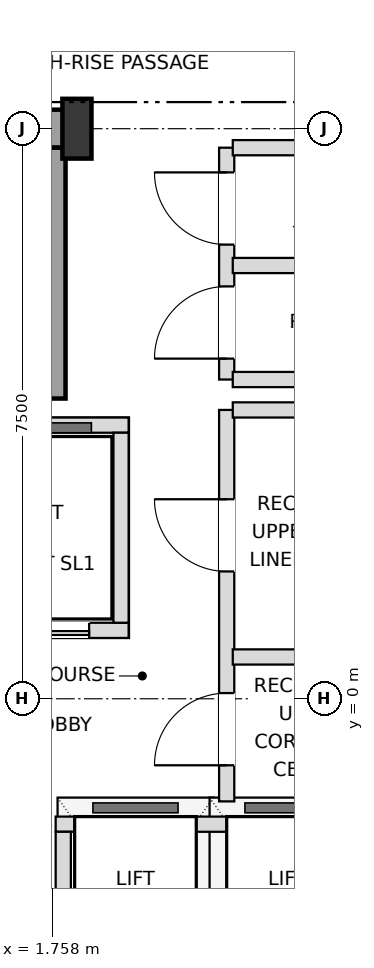
"""IFC4 building model, lengths in metres.
Left out: names, types, materials, properties, quantities, classifications, styles, units other than length and angle.
Written with IfcOpenShell. Run it as: python <this file> out.ifc"""

import sys

from ifc_helpers import new_model, si_unit, direction, frame, frame_2d, origin, origin_2d, place, context, subcontext, project, spatial, rectangle, i_section, extrude, element, fill, save


model = new_model("IFC4")
c1 = context("Model", 3, precision=1e-05, world=origin(), true_north=direction((0.0, 1.0)))
c2 = subcontext(c1, "Body", "Model", "MODEL_VIEW")
j1 = project(units=[si_unit("LENGTHUNIT", "METRE"), si_unit("PLANEANGLEUNIT", "RADIAN")], contexts=[c1])
p1 = place(None, origin())
s1 = spatial("IfcSite", under=j1, at=p1, CompositionType="ELEMENT")
p2 = place(p1, origin())
s2 = spatial("IfcBuilding", under=s1, at=p2, CompositionType="ELEMENT")
p3 = place(p2, frame((0.0, 0.0, 254.7)))
s3 = spatial("IfcBuildingStorey", under=s2, at=p3, CompositionType="ELEMENT", Elevation=254.7)
p4 = place(p3, frame((2.08, 7.5, 0.0), z_axis=(0.0, 0.0, 1.0), x_axis=(1.0, 0.0, 0.0)))
e1 = element("IfcColumn", 1, at=p4, inside=s3, PredefinedType="COLUMN", context=c2, shape_type="SweptSolid", body=[
    extrude(i_section(OverallWidth=0.382, OverallDepth=0.786, WebThickness=0.02, FlangeThickness=0.033, at=origin_2d()), origin(), (0.0, 0.0, 1.0), 3.6),
])
p5 = place(p3, frame((0.0, 7.5, 0.0), z_axis=(0.0, 0.0, 1.0), x_axis=(1.0, 0.0, 0.0)))
e2 = element("IfcWall", 2, at=p5, inside=s3, PredefinedType="SHEAR", context=c2, shape_type="SweptSolid", body=[
    extrude(rectangle(XDim=2.08, YDim=0.5, at=frame_2d((1.04, 0.0))), origin(), (0.0, 0.0, 1.0), 3.38),
])
p6 = place(p3, frame((1.73, 3.95, 0.0), z_axis=(0.0, 0.0, 1.0), x_axis=(0.0, 1.0, 0.0)))
e3 = element("IfcWall", 3, at=p6, inside=s3, PredefinedType="SHEAR", context=c2, shape_type="SweptSolid", body=[
    extrude(rectangle(XDim=3.3, YDim=0.4, at=frame_2d((1.65, 0.0))), origin(), (0.0, 0.0, 1.0), 3.38),
])
p7 = place(p3, frame((-2.82, 0.9, 0.0), z_axis=(0.0, 0.0, 1.0), x_axis=(1.0, 0.0, 0.0)))
e4 = element("IfcWall", 4, at=p7, inside=s3, PredefinedType="SOLIDWALL", context=c2, shape_type="SweptSolid", body=[
    extrude(rectangle(XDim=5.58, YDim=0.2, at=frame_2d((2.79, 0.0))), origin(), (0.0, 0.0, 1.0), 3.38),
])
p8 = place(p7, frame((0.49, 0.0, 0.0)))
e5 = element("IfcOpeningElement", 5, at=p8, cuts=e4, PredefinedType="OPENING", context=c2, shape_type="SweptSolid", body=[
    extrude(rectangle(XDim=1.1, YDim=2.15, at=frame_2d((0.55, 1.075))), frame((0.0, 0.11, 0.0), z_axis=(0.0, -1.0, 0.0), x_axis=(1.0, 0.0, 0.0)), (0.0, 0.0, 1.0), 0.22),
])
p9 = place(p7, frame((2.17, 0.0, 0.0)))
e6 = element("IfcOpeningElement", 6, at=p9, cuts=e4, PredefinedType="OPENING", context=c2, shape_type="SweptSolid", body=[
    extrude(rectangle(XDim=1.1, YDim=2.15, at=frame_2d((0.55, 1.075))), frame((0.0, 0.11, 0.0), z_axis=(0.0, -1.0, 0.0), x_axis=(1.0, 0.0, 0.0)), (0.0, 0.0, 1.0), 0.22),
])
p10 = place(p7, frame((3.86, 0.0, 0.0)))
e7 = element("IfcOpeningElement", 7, at=p10, cuts=e4, PredefinedType="OPENING", context=c2, shape_type="SweptSolid", body=[
    extrude(rectangle(XDim=1.2, YDim=2.2, at=frame_2d((0.6, 1.1))), frame((0.0, 0.11, 0.0), z_axis=(0.0, -1.0, 0.0), x_axis=(1.0, 0.0, 0.0)), (0.0, 0.0, 1.0), 0.22),
])
p11 = place(p3, frame((-2.82, 3.6, 0.0), z_axis=(0.0, 0.0, 1.0), x_axis=(1.0, 0.0, 0.0)))
e8 = element("IfcWall", 8, at=p11, inside=s3, PredefinedType="SOLIDWALL", context=c2, shape_type="SweptSolid", body=[
    extrude(rectangle(XDim=5.58, YDim=0.2, at=frame_2d((2.79, 0.0))), origin(), (0.0, 0.0, 1.0), 3.38),
])
p12 = place(p3, frame((2.66, 1.0, 0.0), z_axis=(0.0, 0.0, 1.0), x_axis=(0.0, 1.0, 0.0)))
e9 = element("IfcWall", 9, at=p12, inside=s3, PredefinedType="SOLIDWALL", context=c2, shape_type="SweptSolid", body=[
    extrude(rectangle(XDim=2.5, YDim=0.2, at=frame_2d((1.25, 0.0))), origin(), (0.0, 0.0, 1.0), 3.38),
])
p13 = place(p3, frame((1.8, -1.65, 0.0), z_axis=(0.0, 0.0, 1.0), x_axis=(1.0, 0.0, 0.0)))
e10 = element("IfcWall", 10, at=p13, inside=s3, PredefinedType="SOLIDWALL", context=c2, shape_type="SweptSolid", body=[
    extrude(rectangle(XDim=4.1, YDim=0.2, at=frame_2d((2.05, 0.0))), origin(), (0.0, 0.0, 1.0), 3.38),
])
p14 = place(p3, frame((1.9, -3.75, 0.0), z_axis=(0.0, 0.0, 1.0), x_axis=(0.0, 1.0, 0.0)))
e11 = element("IfcWall", 11, at=p14, inside=s3, PredefinedType="SOLIDWALL", context=c2, shape_type="SweptSolid", body=[
    extrude(rectangle(XDim=2.0, YDim=0.2, at=frame_2d((1.0, 0.0))), origin(), (0.0, 0.0, 1.0), 3.38),
])
p15 = place(p3, frame((4.05, -1.35, 0.0), z_axis=(0.0, 0.0, 1.0), x_axis=(0.0, 1.0, 0.0)))
e12 = element("IfcWall", 12, at=p15, inside=s3, PredefinedType="SOLIDWALL", context=c2, shape_type="SweptSolid", body=[
    extrude(rectangle(XDim=5.15, YDim=0.2, at=frame_2d((2.575, 0.0))), origin(), (0.0, 0.0, 1.0), 3.38),
])
p16 = place(p15, frame((0.475, 0.0, 0.0)))
e13 = element("IfcOpeningElement", 13, at=p16, cuts=e12, PredefinedType="OPENING", context=c2, shape_type="SweptSolid", body=[
    extrude(rectangle(XDim=0.95, YDim=2.15, at=frame_2d((0.475, 1.075))), frame((0.0, 0.11, 0.0), z_axis=(0.0, -1.0, 0.0), x_axis=(1.0, 0.0, 0.0)), (0.0, 0.0, 1.0), 0.22),
])
p17 = place(p15, frame((3.025, 0.0, 0.0)))
e14 = element("IfcOpeningElement", 14, at=p17, cuts=e12, PredefinedType="OPENING", context=c2, shape_type="SweptSolid", body=[
    extrude(rectangle(XDim=0.95, YDim=2.15, at=frame_2d((0.475, 1.075))), frame((0.0, 0.11, 0.0), z_axis=(0.0, -1.0, 0.0), x_axis=(1.0, 0.0, 0.0)), (0.0, 0.0, 1.0), 0.22),
])
p18 = place(p3, frame((4.05, 4.2, 0.0), z_axis=(0.0, 0.0, 1.0), x_axis=(0.0, 1.0, 0.0)))
e15 = element("IfcWall", 15, at=p18, inside=s3, PredefinedType="SOLIDWALL", context=c2, shape_type="SweptSolid", body=[
    extrude(rectangle(XDim=3.05, YDim=0.2, at=frame_2d((1.525, 0.0))), origin(), (0.0, 0.0, 1.0), 3.38),
])
p19 = place(p18, frame((0.275, 0.0, 0.0)))
e16 = element("IfcOpeningElement", 16, at=p19, cuts=e15, PredefinedType="OPENING", context=c2, shape_type="SweptSolid", body=[
    extrude(rectangle(XDim=0.95, YDim=2.15, at=frame_2d((0.475, 1.075))), frame((0.0, 0.11, 0.0), z_axis=(0.0, -1.0, 0.0), x_axis=(1.0, 0.0, 0.0)), (0.0, 0.0, 1.0), 0.22),
])
p20 = place(p18, frame((1.775, 0.0, 0.0)))
e17 = element("IfcOpeningElement", 17, at=p20, cuts=e15, PredefinedType="OPENING", context=c2, shape_type="SweptSolid", body=[
    extrude(rectangle(XDim=0.95, YDim=2.15, at=frame_2d((0.475, 1.075))), frame((0.0, 0.11, 0.0), z_axis=(0.0, -1.0, 0.0), x_axis=(1.0, 0.0, 0.0)), (0.0, 0.0, 1.0), 0.22),
])
for number, where, z_axis, x_axis in (
    (18, (4.13, 0.55, 0.0), (0.0, 0.0, 1.0), (1.0, 0.0, 0.0)),
    (19, (4.13, 3.8, 0.0), (0.0, 0.0, 1.0), (1.0, 0.0, 0.0)),
):
    element("IfcWall", number, at=place(p3, frame(where, z_axis=z_axis, x_axis=x_axis)), inside=s3, PredefinedType="SOLIDWALL", context=c2, shape_type="SweptSolid", body=[
        extrude(rectangle(XDim=2.04, YDim=0.2, at=frame_2d((1.02, 0.0))), origin(), (0.0, 0.0, 1.0), 3.38),
    ])
for number, where, z_axis, x_axis in (
    (20, (4.13, 4.2, 0.0), (0.0, 0.0, 1.0), (1.0, 0.0, 0.0)),
    (21, (4.13, 5.7, 0.0), (0.0, 0.0, 1.0), (1.0, 0.0, 0.0)),
    (22, (4.13, 7.25, 0.0), (0.0, 0.0, 1.0), (1.0, 0.0, 0.0)),
):
    element("IfcWall", number, at=place(p3, frame(where, z_axis=z_axis, x_axis=x_axis)), inside=s3, PredefinedType="SOLIDWALL", context=c2, shape_type="SweptSolid", body=[
        extrude(rectangle(XDim=2.07, YDim=0.2, at=frame_2d((1.035, 0.0))), origin(), (0.0, 0.0, 1.0), 3.38),
    ])
p21 = place(p10, origin())
e23 = element("IfcDoor", 23, at=p21, inside=s3, OperationType="DOUBLE_DOOR_SLIDING", PredefinedType="DOOR", context=c2, shape_type="SweptSolid", body=[
    extrude(rectangle(XDim=1.2, YDim=2.2, at=frame_2d((0.6, 1.1))), frame((0.0, 0.025, 0.0), z_axis=(0.0, -1.0, 0.0), x_axis=(1.0, 0.0, 0.0)), (0.0, 0.0, 1.0), 0.05),
])
fill(e7, e23)
p22 = place(p16, origin())
e24 = element("IfcDoor", 24, at=p22, inside=s3, OperationType="SINGLE_SWING_LEFT", PredefinedType="DOOR", context=c2, shape_type="SweptSolid", body=[
    extrude(rectangle(XDim=0.95, YDim=2.15, at=frame_2d((0.475, 1.075))), frame((0.0, 0.025, 0.0), z_axis=(0.0, -1.0, 0.0), x_axis=(1.0, 0.0, 0.0)), (0.0, 0.0, 1.0), 0.05),
])
fill(e13, e24)
p23 = place(p17, origin())
e25 = element("IfcDoor", 25, at=p23, inside=s3, OperationType="SINGLE_SWING_RIGHT", PredefinedType="DOOR", context=c2, shape_type="SweptSolid", body=[
    extrude(rectangle(XDim=0.95, YDim=2.15, at=frame_2d((0.475, 1.075))), frame((0.0, 0.025, 0.0), z_axis=(0.0, -1.0, 0.0), x_axis=(1.0, 0.0, 0.0)), (0.0, 0.0, 1.0), 0.05),
])
fill(e14, e25)
p24 = place(p19, origin())
e26 = element("IfcDoor", 26, at=p24, inside=s3, OperationType="SINGLE_SWING_LEFT", PredefinedType="DOOR", context=c2, shape_type="SweptSolid", body=[
    extrude(rectangle(XDim=0.95, YDim=2.15, at=frame_2d((0.475, 1.075))), frame((0.0, 0.025, 0.0), z_axis=(0.0, -1.0, 0.0), x_axis=(1.0, 0.0, 0.0)), (0.0, 0.0, 1.0), 0.05),
])
fill(e16, e26)
p25 = place(p20, origin())
e27 = element("IfcDoor", 27, at=p25, inside=s3, OperationType="SINGLE_SWING_RIGHT", PredefinedType="DOOR", context=c2, shape_type="SweptSolid", body=[
    extrude(rectangle(XDim=0.95, YDim=2.15, at=frame_2d((0.475, 1.075))), frame((0.0, 0.025, 0.0), z_axis=(0.0, -1.0, 0.0), x_axis=(1.0, 0.0, 0.0)), (0.0, 0.0, 1.0), 0.05),
])
fill(e17, e27)
save(model, sys.argv[1])
